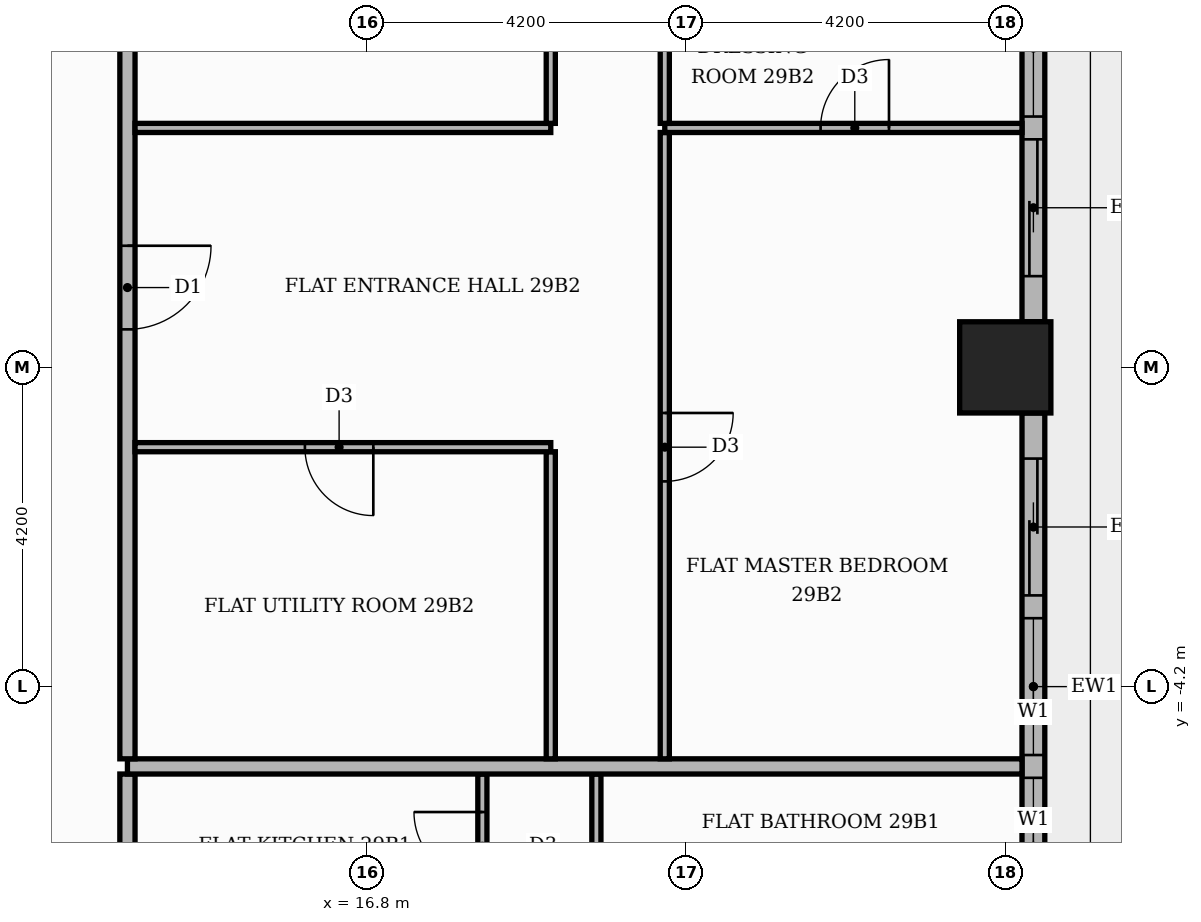
"""IFC4 building model, lengths in metres.
Left out: names, types, materials, properties, quantities, classifications, styles, units other than length and angle.
Written with IfcOpenShell. Run it as: python <this file> out.ifc"""

import sys

from ifc_helpers import new_model, si_unit, direction, frame, frame_2d, origin, origin_2d, place, context, subcontext, project, spatial, rectangle, extrude, element, fill, save


model = new_model("IFC4")
c1 = context("Model", 3, precision=1e-05, world=origin(), true_north=direction((0.0, 1.0)))
c2 = subcontext(c1, "Body", "Model", "MODEL_VIEW")
j1 = project(units=[si_unit("LENGTHUNIT", "METRE"), si_unit("PLANEANGLEUNIT", "RADIAN")], contexts=[c1])
p1 = place(None, origin())
s1 = spatial("IfcSite", under=j1, at=p1, CompositionType="ELEMENT")
p2 = place(p1, origin())
s2 = spatial("IfcBuilding", under=s1, at=p2, CompositionType="ELEMENT")
p3 = place(p2, frame((0.0, 0.0, 122.1)))
s3 = spatial("IfcBuildingStorey", under=s2, at=p3, CompositionType="ELEMENT", Elevation=122.1)
p4 = place(p3, frame((25.2, 0.0, 0.0), z_axis=(0.0, 0.0, 1.0), x_axis=(1.0, 0.0, 0.0)))
e1 = element("IfcColumn", 1, at=p4, inside=s3, PredefinedType="COLUMN", context=c2, shape_type="SweptSolid", body=[
    extrude(rectangle(XDim=1.2, YDim=1.2, at=origin_2d()), origin(), (0.0, 0.0, 1.0), 3.9),
])
p5 = place(p3, frame((25.57, -7.8, 0.0), z_axis=(0.0, 0.0, 1.0), x_axis=(0.0, 1.0, 0.0)))
e2 = element("IfcWall", 2, at=p5, inside=s3, PredefinedType="STANDARD", context=c2, shape_type="SweptSolid", body=[
    extrude(rectangle(XDim=7.2, YDim=0.3, at=frame_2d((3.6, 0.0))), origin(), (0.0, 0.0, 1.0), 3.4),
])
p6 = place(p5, frame((0.6, 0.0, 0.9)))
e3 = element("IfcOpeningElement", 3, at=p6, cuts=e2, PredefinedType="OPENING", context=c2, shape_type="SweptSolid", body=[
    extrude(rectangle(XDim=1.8, YDim=2.1, at=frame_2d((0.9, 1.05))), frame((0.0, 0.16, 0.0), z_axis=(0.0, -1.0, 0.0), x_axis=(1.0, 0.0, 0.0)), (0.0, 0.0, 1.0), 0.32),
])
p7 = place(p5, frame((2.7, 0.0, 0.9)))
e4 = element("IfcOpeningElement", 4, at=p7, cuts=e2, PredefinedType="OPENING", context=c2, shape_type="SweptSolid", body=[
    extrude(rectangle(XDim=1.8, YDim=2.1, at=frame_2d((0.9, 1.05))), frame((0.0, 0.16, 0.0), z_axis=(0.0, -1.0, 0.0), x_axis=(1.0, 0.0, 0.0)), (0.0, 0.0, 1.0), 0.32),
])
p8 = place(p5, frame((4.8, 0.0, 0.0)))
e5 = element("IfcOpeningElement", 5, at=p8, cuts=e2, PredefinedType="OPENING", context=c2, shape_type="SweptSolid", body=[
    extrude(rectangle(XDim=1.8, YDim=2.4, at=frame_2d((0.9, 1.2))), frame((0.0, 0.16, 0.0), z_axis=(0.0, -1.0, 0.0), x_axis=(1.0, 0.0, 0.0)), (0.0, 0.0, 1.0), 0.32),
])
p9 = place(p3, frame((25.57, 0.6, 0.0), z_axis=(0.0, 0.0, 1.0), x_axis=(0.0, 1.0, 0.0)))
e6 = element("IfcWall", 6, at=p9, inside=s3, PredefinedType="STANDARD", context=c2, shape_type="SweptSolid", body=[
    extrude(rectangle(XDim=7.2, YDim=0.3, at=frame_2d((3.6, 0.0))), origin(), (0.0, 0.0, 1.0), 3.4),
])
p10 = place(p9, frame((0.6, 0.0, 0.0)))
e7 = element("IfcOpeningElement", 7, at=p10, cuts=e6, PredefinedType="OPENING", context=c2, shape_type="SweptSolid", body=[
    extrude(rectangle(XDim=1.8, YDim=2.4, at=frame_2d((0.9, 1.2))), frame((0.0, 0.16, 0.0), z_axis=(0.0, -1.0, 0.0), x_axis=(1.0, 0.0, 0.0)), (0.0, 0.0, 1.0), 0.32),
])
p11 = place(p9, frame((2.7, 0.0, 0.9)))
e8 = element("IfcOpeningElement", 8, at=p11, cuts=e6, PredefinedType="OPENING", context=c2, shape_type="SweptSolid", body=[
    extrude(rectangle(XDim=1.8, YDim=2.1, at=frame_2d((0.9, 1.05))), frame((0.0, 0.16, 0.0), z_axis=(0.0, -1.0, 0.0), x_axis=(1.0, 0.0, 0.0)), (0.0, 0.0, 1.0), 0.32),
])
p12 = place(p9, frame((4.8, 0.0, 0.9)))
e9 = element("IfcOpeningElement", 9, at=p12, cuts=e6, PredefinedType="OPENING", context=c2, shape_type="SweptSolid", body=[
    extrude(rectangle(XDim=1.8, YDim=2.1, at=frame_2d((0.9, 1.05))), frame((0.0, 0.16, 0.0), z_axis=(0.0, -1.0, 0.0), x_axis=(1.0, 0.0, 0.0)), (0.0, 0.0, 1.0), 0.32),
])
p13 = place(p3, frame((13.65, -13.55, 0.0), z_axis=(0.0, 0.0, 1.0), x_axis=(0.0, 1.0, 0.0)))
e10 = element("IfcWall", 10, at=p13, inside=s3, PredefinedType="PARTITIONING", context=c2, shape_type="SweptSolid", body=[
    extrude(rectangle(XDim=8.2, YDim=0.2, at=frame_2d((4.1, 0.0))), origin(), (0.0, 0.0, 1.0), 3.4),
])
p14 = place(p13, frame((1.45, 0.0, 0.0)))
e11 = element("IfcOpeningElement", 11, at=p14, cuts=e10, PredefinedType="OPENING", context=c2, shape_type="SweptSolid", body=[
    extrude(rectangle(XDim=1.1, YDim=2.4, at=frame_2d((0.55, 1.2))), frame((0.0, 0.11, 0.0), z_axis=(0.0, -1.0, 0.0), x_axis=(1.0, 0.0, 0.0)), (0.0, 0.0, 1.0), 0.22),
])
p15 = place(p3, frame((18.32, -7.29, 0.0), z_axis=(0.0, 0.0, 1.0), x_axis=(0.0, 1.0, 0.0)))
e12 = element("IfcWall", 12, at=p15, inside=s3, PredefinedType="PARTITIONING", context=c2, shape_type="SweptSolid", body=[
    extrude(rectangle(XDim=1.94, YDim=0.12, at=frame_2d((0.97, 0.0))), origin(), (0.0, 0.0, 1.0), 3.4),
])
p16 = place(p15, frame((0.54, 0.0, 0.0)))
e13 = element("IfcOpeningElement", 13, at=p16, cuts=e12, PredefinedType="OPENING", context=c2, shape_type="SweptSolid", body=[
    extrude(rectangle(XDim=0.9, YDim=2.1, at=frame_2d((0.45, 1.05))), frame((0.0, 0.07, 0.0), z_axis=(0.0, -1.0, 0.0), x_axis=(1.0, 0.0, 0.0)), (0.0, 0.0, 1.0), 0.14),
])
p17 = place(p3, frame((19.82, -7.29, 0.0), z_axis=(0.0, 0.0, 1.0), x_axis=(0.0, 1.0, 0.0)))
e14 = element("IfcWall", 14, at=p17, inside=s3, PredefinedType="PARTITIONING", context=c2, shape_type="SweptSolid", body=[
    extrude(rectangle(XDim=1.94, YDim=0.12, at=frame_2d((0.97, 0.0))), origin(), (0.0, 0.0, 1.0), 3.4),
])
p18 = place(p3, frame((13.65, -5.25, 0.0), z_axis=(0.0, 0.0, 1.0), x_axis=(1.0, 0.0, 0.0)))
e15 = element("IfcWall", 15, at=p18, inside=s3, PredefinedType="PARTITIONING", context=c2, shape_type="SweptSolid", body=[
    extrude(rectangle(XDim=11.77, YDim=0.2, at=frame_2d((5.885, 0.0))), origin(), (0.0, 0.0, 1.0), 3.4),
])
p19 = place(p3, frame((13.65, -5.15, 0.0), z_axis=(0.0, 0.0, 1.0), x_axis=(0.0, 1.0, 0.0)))
e16 = element("IfcWall", 16, at=p19, inside=s3, PredefinedType="PARTITIONING", context=c2, shape_type="SweptSolid", body=[
    extrude(rectangle(XDim=18.7, YDim=0.2, at=frame_2d((9.35, 0.0))), origin(), (0.0, 0.0, 1.0), 3.4),
])
p20 = place(p19, frame((5.65, 0.0, 0.0)))
e17 = element("IfcOpeningElement", 17, at=p20, cuts=e16, PredefinedType="OPENING", context=c2, shape_type="SweptSolid", body=[
    extrude(rectangle(XDim=1.1, YDim=2.4, at=frame_2d((0.55, 1.2))), frame((0.0, 0.11, 0.0), z_axis=(0.0, -1.0, 0.0), x_axis=(1.0, 0.0, 0.0)), (0.0, 0.0, 1.0), 0.22),
])
p21 = place(p3, frame((19.22, -5.15, 0.0), z_axis=(0.0, 0.0, 1.0), x_axis=(0.0, 1.0, 0.0)))
e18 = element("IfcWall", 18, at=p21, inside=s3, PredefinedType="PARTITIONING", context=c2, shape_type="SweptSolid", body=[
    extrude(rectangle(XDim=4.04, YDim=0.12, at=frame_2d((2.02, 0.0))), origin(), (0.0, 0.0, 1.0), 3.4),
])
p22 = place(p3, frame((20.72, -5.15, 0.0), z_axis=(0.0, 0.0, 1.0), x_axis=(0.0, 1.0, 0.0)))
e19 = element("IfcWall", 19, at=p22, inside=s3, PredefinedType="PARTITIONING", context=c2, shape_type="SweptSolid", body=[
    extrude(rectangle(XDim=8.24, YDim=0.12, at=frame_2d((4.12, 0.0))), origin(), (0.0, 0.0, 1.0), 3.4),
])
p23 = place(p22, frame((3.65, 0.0, 0.0)))
e20 = element("IfcOpeningElement", 20, at=p23, cuts=e19, PredefinedType="OPENING", context=c2, shape_type="SweptSolid", body=[
    extrude(rectangle(XDim=0.9, YDim=2.1, at=frame_2d((0.45, 1.05))), frame((0.0, 0.07, 0.0), z_axis=(0.0, -1.0, 0.0), x_axis=(1.0, 0.0, 0.0)), (0.0, 0.0, 1.0), 0.14),
])
p24 = place(p3, frame((13.75, -1.05, 0.0), z_axis=(0.0, 0.0, 1.0), x_axis=(1.0, 0.0, 0.0)))
e21 = element("IfcWall", 21, at=p24, inside=s3, PredefinedType="PARTITIONING", context=c2, shape_type="SweptSolid", body=[
    extrude(rectangle(XDim=5.47, YDim=0.12, at=frame_2d((2.735, 0.0))), origin(), (0.0, 0.0, 1.0), 3.4),
])
p25 = place(p24, frame((2.235, 0.0, 0.0)))
e22 = element("IfcOpeningElement", 22, at=p25, cuts=e21, PredefinedType="OPENING", context=c2, shape_type="SweptSolid", body=[
    extrude(rectangle(XDim=0.9, YDim=2.1, at=frame_2d((0.45, 1.05))), frame((0.0, 0.07, 0.0), z_axis=(0.0, -1.0, 0.0), x_axis=(1.0, 0.0, 0.0)), (0.0, 0.0, 1.0), 0.14),
])
p26 = place(p3, frame((13.75, 3.15, 0.0), z_axis=(0.0, 0.0, 1.0), x_axis=(1.0, 0.0, 0.0)))
e23 = element("IfcWall", 23, at=p26, inside=s3, PredefinedType="PARTITIONING", context=c2, shape_type="SweptSolid", body=[
    extrude(rectangle(XDim=5.47, YDim=0.12, at=frame_2d((2.735, 0.0))), origin(), (0.0, 0.0, 1.0), 3.4),
])
p27 = place(p3, frame((20.72, 3.15, 0.0), z_axis=(0.0, 0.0, 1.0), x_axis=(1.0, 0.0, 0.0)))
e24 = element("IfcWall", 24, at=p27, inside=s3, PredefinedType="PARTITIONING", context=c2, shape_type="SweptSolid", body=[
    extrude(rectangle(XDim=4.7, YDim=0.12, at=frame_2d((2.35, 0.0))), origin(), (0.0, 0.0, 1.0), 3.4),
])
p28 = place(p27, frame((2.05, 0.0, 0.0)))
e25 = element("IfcOpeningElement", 25, at=p28, cuts=e24, PredefinedType="OPENING", context=c2, shape_type="SweptSolid", body=[
    extrude(rectangle(XDim=0.9, YDim=2.1, at=frame_2d((0.45, 1.05))), frame((0.0, 0.07, 0.0), z_axis=(0.0, -1.0, 0.0), x_axis=(1.0, 0.0, 0.0)), (0.0, 0.0, 1.0), 0.14),
])
p29 = place(p3, frame((19.22, 3.21, 0.0), z_axis=(0.0, 0.0, 1.0), x_axis=(0.0, 1.0, 0.0)))
e26 = element("IfcWall", 26, at=p29, inside=s3, PredefinedType="PARTITIONING", context=c2, shape_type="SweptSolid", body=[
    extrude(rectangle(XDim=6.18, YDim=0.12, at=frame_2d((3.09, 0.0))), origin(), (0.0, 0.0, 1.0), 3.4),
])
p30 = place(p29, frame((2.64, 0.0, 0.0)))
e27 = element("IfcOpeningElement", 27, at=p30, cuts=e26, PredefinedType="OPENING", context=c2, shape_type="SweptSolid", body=[
    extrude(rectangle(XDim=0.9, YDim=2.1, at=frame_2d((0.45, 1.05))), frame((0.0, 0.07, 0.0), z_axis=(0.0, -1.0, 0.0), x_axis=(1.0, 0.0, 0.0)), (0.0, 0.0, 1.0), 0.14),
])
p31 = place(p3, frame((20.72, 3.21, 0.0), z_axis=(0.0, 0.0, 1.0), x_axis=(0.0, 1.0, 0.0)))
e28 = element("IfcWall", 28, at=p31, inside=s3, PredefinedType="PARTITIONING", context=c2, shape_type="SweptSolid", body=[
    extrude(rectangle(XDim=1.98, YDim=0.12, at=frame_2d((0.99, 0.0))), origin(), (0.0, 0.0, 1.0), 3.4),
])
p32 = place(p6, origin())
e29 = element("IfcWindow", 29, at=p32, inside=s3, PartitioningType="SINGLE_PANEL", PredefinedType="WINDOW", context=c2, shape_type="SweptSolid", body=[
    extrude(rectangle(XDim=1.8, YDim=2.1, at=frame_2d((0.9, 1.05))), frame((0.0, 0.03, 0.0), z_axis=(0.0, -1.0, 0.0), x_axis=(1.0, 0.0, 0.0)), (0.0, 0.0, 1.0), 0.06),
])
fill(e3, e29)
p33 = place(p7, origin())
e30 = element("IfcWindow", 30, at=p33, inside=s3, PartitioningType="SINGLE_PANEL", PredefinedType="WINDOW", context=c2, shape_type="SweptSolid", body=[
    extrude(rectangle(XDim=1.8, YDim=2.1, at=frame_2d((0.9, 1.05))), frame((0.0, 0.03, 0.0), z_axis=(0.0, -1.0, 0.0), x_axis=(1.0, 0.0, 0.0)), (0.0, 0.0, 1.0), 0.06),
])
fill(e4, e30)
p34 = place(p8, origin())
e31 = element("IfcDoor", 31, at=p34, inside=s3, OperationType="SLIDING_TO_RIGHT", PredefinedType="DOOR", context=c2, shape_type="SweptSolid", body=[
    extrude(rectangle(XDim=1.8, YDim=2.4, at=frame_2d((0.9, 1.2))), frame((0.0, 0.025, 0.0), z_axis=(0.0, -1.0, 0.0), x_axis=(1.0, 0.0, 0.0)), (0.0, 0.0, 1.0), 0.05),
])
fill(e5, e31)
p35 = place(p10, origin())
e32 = element("IfcDoor", 32, at=p35, inside=s3, OperationType="SLIDING_TO_LEFT", PredefinedType="DOOR", context=c2, shape_type="SweptSolid", body=[
    extrude(rectangle(XDim=1.8, YDim=2.4, at=frame_2d((0.9, 1.2))), frame((0.0, 0.025, 0.0), z_axis=(0.0, -1.0, 0.0), x_axis=(1.0, 0.0, 0.0)), (0.0, 0.0, 1.0), 0.05),
])
fill(e7, e32)
p36 = place(p11, origin())
e33 = element("IfcWindow", 33, at=p36, inside=s3, PartitioningType="SINGLE_PANEL", PredefinedType="WINDOW", context=c2, shape_type="SweptSolid", body=[
    extrude(rectangle(XDim=1.8, YDim=2.1, at=frame_2d((0.9, 1.05))), frame((0.0, 0.03, 0.0), z_axis=(0.0, -1.0, 0.0), x_axis=(1.0, 0.0, 0.0)), (0.0, 0.0, 1.0), 0.06),
])
fill(e8, e33)
p37 = place(p16, origin())
e34 = element("IfcDoor", 34, at=p37, inside=s3, OperationType="SINGLE_SWING_RIGHT", PredefinedType="DOOR", context=c2, shape_type="SweptSolid", body=[
    extrude(rectangle(XDim=0.9, YDim=2.1, at=frame_2d((0.45, 1.05))), frame((0.0, 0.025, 0.0), z_axis=(0.0, -1.0, 0.0), x_axis=(1.0, 0.0, 0.0)), (0.0, 0.0, 1.0), 0.05),
])
fill(e13, e34)
p38 = place(p20, frame((1.1, 0.0, 0.0), z_axis=(0.0, 0.0, 1.0), x_axis=(-1.0, 0.0, 0.0)))
e35 = element("IfcDoor", 35, at=p38, inside=s3, OperationType="SINGLE_SWING_RIGHT", PredefinedType="DOOR", context=c2, shape_type="SweptSolid", body=[
    extrude(rectangle(XDim=1.1, YDim=2.4, at=frame_2d((0.55, 1.2))), frame((0.0, 0.025, 0.0), z_axis=(0.0, -1.0, 0.0), x_axis=(1.0, 0.0, 0.0)), (0.0, 0.0, 1.0), 0.05),
])
fill(e17, e35)
p39 = place(p25, frame((0.9, 0.0, 0.0), z_axis=(0.0, 0.0, 1.0), x_axis=(-1.0, 0.0, 0.0)))
e36 = element("IfcDoor", 36, at=p39, inside=s3, OperationType="SINGLE_SWING_RIGHT", PredefinedType="DOOR", context=c2, shape_type="SweptSolid", body=[
    extrude(rectangle(XDim=0.9, YDim=2.1, at=frame_2d((0.45, 1.05))), frame((0.0, 0.025, 0.0), z_axis=(0.0, -1.0, 0.0), x_axis=(1.0, 0.0, 0.0)), (0.0, 0.0, 1.0), 0.05),
])
fill(e22, e36)
p40 = place(p23, frame((0.9, 0.0, 0.0), z_axis=(0.0, 0.0, 1.0), x_axis=(-1.0, 0.0, 0.0)))
e37 = element("IfcDoor", 37, at=p40, inside=s3, OperationType="SINGLE_SWING_RIGHT", PredefinedType="DOOR", context=c2, shape_type="SweptSolid", body=[
    extrude(rectangle(XDim=0.9, YDim=2.1, at=frame_2d((0.45, 1.05))), frame((0.0, 0.025, 0.0), z_axis=(0.0, -1.0, 0.0), x_axis=(1.0, 0.0, 0.0)), (0.0, 0.0, 1.0), 0.05),
])
fill(e20, e37)
p41 = place(p28, origin())
e38 = element("IfcDoor", 38, at=p41, inside=s3, OperationType="SINGLE_SWING_RIGHT", PredefinedType="DOOR", context=c2, shape_type="SweptSolid", body=[
    extrude(rectangle(XDim=0.9, YDim=2.1, at=frame_2d((0.45, 1.05))), frame((0.0, 0.025, 0.0), z_axis=(0.0, -1.0, 0.0), x_axis=(1.0, 0.0, 0.0)), (0.0, 0.0, 1.0), 0.05),
])
fill(e25, e38)
save(model, sys.argv[1])
